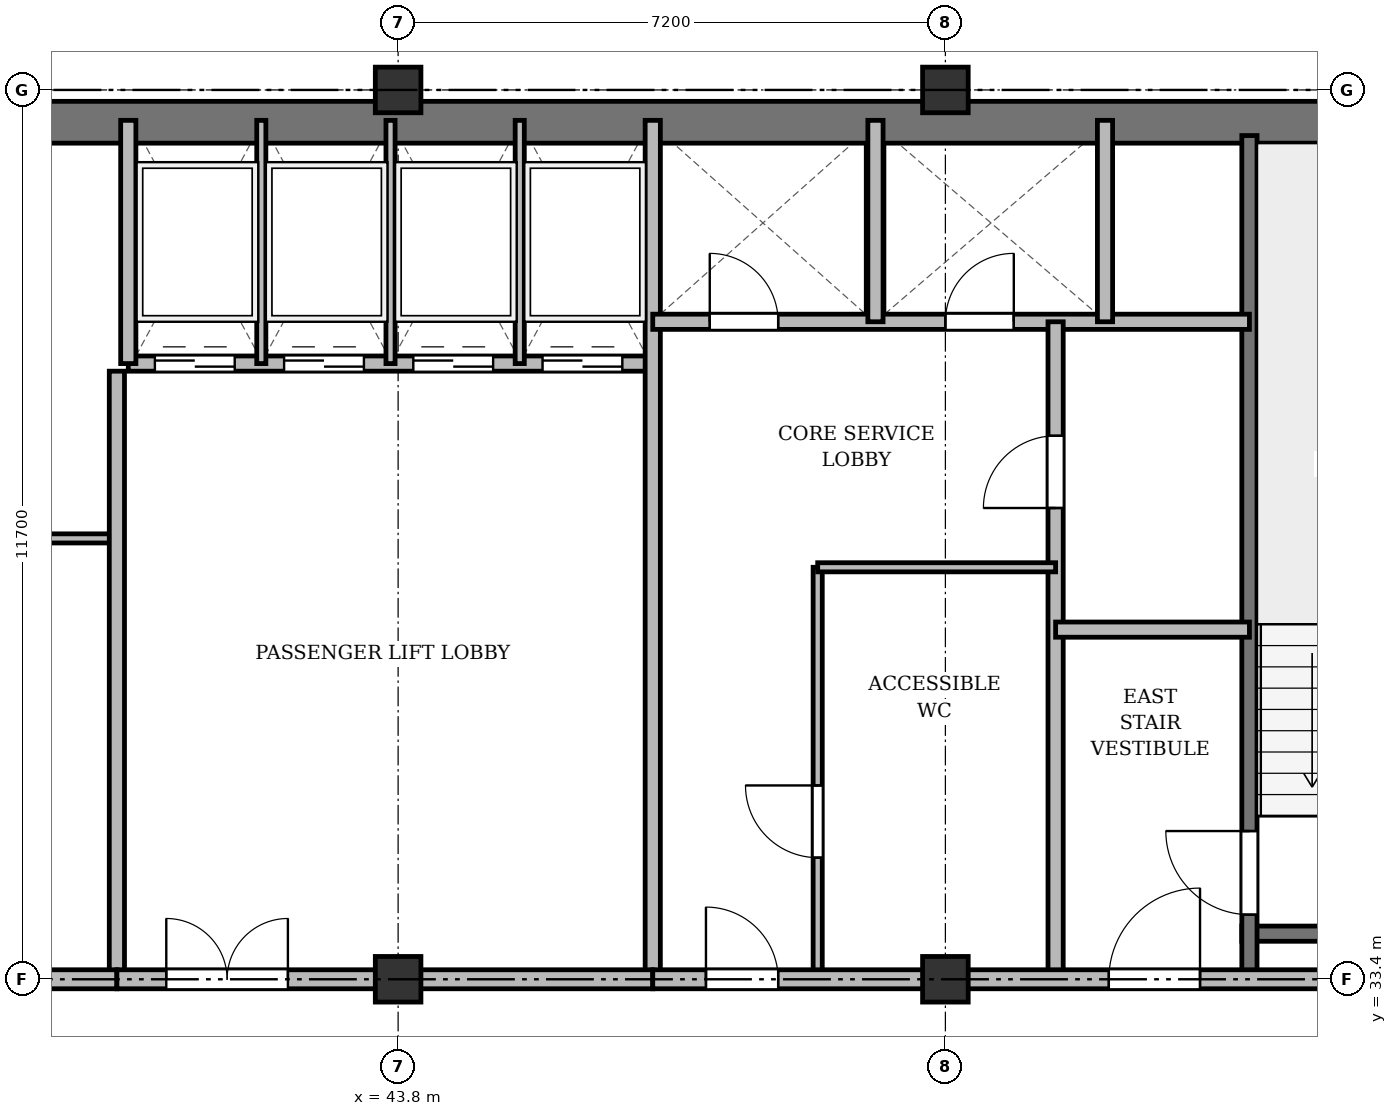
"""IFC4 building model, lengths in metres.
Left out: names, types, materials, properties, quantities, classifications, styles, units other than length and angle.
Written with IfcOpenShell. Run it as: python <this file> out.ifc"""

import sys

from ifc_helpers import new_model, si_unit, direction, frame, frame_2d, origin, origin_2d, place, context, subcontext, project, spatial, rectangle, extrude, source, transform, mapped, element, fill, save


model = new_model("IFC4")
c1 = context("Model", 3, precision=1e-05, world=origin(), true_north=direction((0.0, 1.0)))
c2 = subcontext(c1, "Body", "Model", "MODEL_VIEW")
j1 = project(units=[si_unit("LENGTHUNIT", "METRE"), si_unit("PLANEANGLEUNIT", "RADIAN")], contexts=[c1])
p1 = place(None, origin())
s1 = spatial("IfcSite", under=j1, at=p1, CompositionType="ELEMENT")
p2 = place(p1, origin())
s2 = spatial("IfcBuilding", under=s1, at=p2, CompositionType="ELEMENT")
p3 = place(p2, frame((0.0, 0.0, 277.5)))
s3 = spatial("IfcBuildingStorey", under=s2, at=p3, CompositionType="ELEMENT", Elevation=277.5)
m1 = source(origin(), c2, "Body", "SweptSolid", [
    extrude(rectangle(XDim=0.6, YDim=0.6, at=origin_2d()), origin(), (0.0, 0.0, 1.0), 3.6),
])
for number, where, z_axis, x_axis in (
    (1, (43.8, 33.4, 0.0), (0.0, 0.0, 1.0), (1.0, 0.0, 0.0)),
    (2, (43.8, 45.1, 0.0), (0.0, 0.0, 1.0), (1.0, 0.0, 0.0)),
    (3, (51.0, 33.4, 0.0), (0.0, 0.0, 1.0), (1.0, 0.0, 0.0)),
    (4, (51.0, 45.1, 0.0), (0.0, 0.0, 1.0), (1.0, 0.0, 0.0)),
):
    element("IfcColumn", number, at=place(p3, frame(where, z_axis=z_axis, x_axis=x_axis)), inside=s3, PredefinedType="COLUMN", context=c2, shape_type="MappedRepresentation", body=[
        mapped(m1, transform((0.0, 0.0, 0.0), x_axis=(1.0, 0.0, 0.0), y_axis=(0.0, 1.0, 0.0), z_axis=(0.0, 0.0, 1.0), scale=1.0)),
    ])
p4 = place(p3, frame((15.65, 44.675, 0.0), z_axis=(0.0, 0.0, 1.0), x_axis=(1.0, 0.0, 0.0)))
e5 = element("IfcWall", 5, at=p4, inside=s3, PredefinedType="SHEAR", context=c2, shape_type="SweptSolid", body=[
    extrude(rectangle(XDim=43.1, YDim=0.55, at=frame_2d((21.55, 0.0))), origin(), (0.0, 0.0, 1.0), 3.37),
])
p5 = place(p3, frame((54.9, 34.0, 0.0), z_axis=(0.0, 0.0, 1.0), x_axis=(1.0, 0.0, 0.0)))
e6 = element("IfcWall", 6, at=p5, inside=s3, PredefinedType="SHEAR", context=c2, shape_type="SweptSolid", body=[
    extrude(rectangle(XDim=3.4, YDim=0.2, at=frame_2d((1.7, 0.0))), origin(), (0.0, 0.0, 1.0), 3.37),
])
p6 = place(p3, frame((55.0, 33.4, 0.0), z_axis=(0.0, 0.0, 1.0), x_axis=(0.0, 1.0, 0.0)))
e7 = element("IfcWall", 7, at=p6, inside=s3, PredefinedType="SHEAR", context=c2, shape_type="SweptSolid", body=[
    extrude(rectangle(XDim=11.1, YDim=0.2, at=frame_2d((5.55, 0.0))), origin(), (0.0, 0.0, 1.0), 3.37),
])
p7 = place(p6, frame((0.85, 0.0, 0.0)))
e8 = element("IfcOpeningElement", 8, at=p7, cuts=e7, PredefinedType="OPENING", context=c2, shape_type="SweptSolid", body=[
    extrude(rectangle(XDim=1.1, YDim=2.15, at=frame_2d((0.55, 1.075))), frame((0.0, 0.11, 0.0), z_axis=(0.0, -1.0, 0.0), x_axis=(1.0, 0.0, 0.0)), (0.0, 0.0, 1.0), 0.22),
])
p8 = place(p3, frame((33.3, 39.2, 0.0), z_axis=(0.0, 0.0, 1.0), x_axis=(1.0, 0.0, 0.0)))
e9 = element("IfcWall", 9, at=p8, inside=s3, PredefinedType="PARTITIONING", context=c2, shape_type="SweptSolid", body=[
    extrude(rectangle(XDim=6.8, YDim=0.12, at=frame_2d((3.4, 0.0))), origin(), (0.0, 0.0, 1.0), 3.37),
])
p9 = place(p8, frame((2.6, 0.0, 0.0)))
e10 = element("IfcOpeningElement", 10, at=p9, cuts=e9, PredefinedType="OPENING", context=c2, shape_type="SweptSolid", body=[
    extrude(rectangle(XDim=0.95, YDim=2.15, at=frame_2d((0.475, 1.075))), frame((0.0, 0.07, 0.0), z_axis=(0.0, -1.0, 0.0), x_axis=(1.0, 0.0, 0.0)), (0.0, 0.0, 1.0), 0.14),
])
p10 = place(p3, frame((40.1, 33.4, 0.0), z_axis=(0.0, 0.0, 1.0), x_axis=(0.0, 1.0, 0.0)))
e11 = element("IfcWall", 11, at=p10, inside=s3, PredefinedType="SOLIDWALL", context=c2, shape_type="SweptSolid", body=[
    extrude(rectangle(XDim=8.0, YDim=0.2, at=frame_2d((4.0, 0.0))), origin(), (0.0, 0.0, 1.0), 2.92),
])
p11 = place(p3, frame((40.25, 41.5, 0.0), z_axis=(0.0, 0.0, 1.0), x_axis=(1.0, 0.0, 0.0)))
e12 = element("IfcWall", 12, at=p11, inside=s3, PredefinedType="SOLIDWALL", context=c2, shape_type="SweptSolid", body=[
    extrude(rectangle(XDim=6.9, YDim=0.2, at=frame_2d((3.45, 0.0))), origin(), (0.0, 0.0, 1.0), 3.37),
])
p12 = place(p11, frame((0.35, 0.0, 0.0)))
e13 = element("IfcOpeningElement", 13, at=p12, cuts=e12, PredefinedType="OPENING", context=c2, shape_type="SweptSolid", body=[
    extrude(rectangle(XDim=1.05, YDim=2.15, at=frame_2d((0.525, 1.075))), frame((0.0, 0.11, 0.0), z_axis=(0.0, -1.0, 0.0), x_axis=(1.0, 0.0, 0.0)), (0.0, 0.0, 1.0), 0.22),
])
p13 = place(p11, frame((2.05, 0.0, 0.0)))
e14 = element("IfcOpeningElement", 14, at=p13, cuts=e12, PredefinedType="OPENING", context=c2, shape_type="SweptSolid", body=[
    extrude(rectangle(XDim=1.05, YDim=2.15, at=frame_2d((0.525, 1.075))), frame((0.0, 0.11, 0.0), z_axis=(0.0, -1.0, 0.0), x_axis=(1.0, 0.0, 0.0)), (0.0, 0.0, 1.0), 0.22),
])
p14 = place(p11, frame((3.75, 0.0, 0.0)))
e15 = element("IfcOpeningElement", 15, at=p14, cuts=e12, PredefinedType="OPENING", context=c2, shape_type="SweptSolid", body=[
    extrude(rectangle(XDim=1.05, YDim=2.15, at=frame_2d((0.525, 1.075))), frame((0.0, 0.11, 0.0), z_axis=(0.0, -1.0, 0.0), x_axis=(1.0, 0.0, 0.0)), (0.0, 0.0, 1.0), 0.22),
])
p15 = place(p11, frame((5.45, 0.0, 0.0)))
e16 = element("IfcOpeningElement", 16, at=p15, cuts=e12, PredefinedType="OPENING", context=c2, shape_type="SweptSolid", body=[
    extrude(rectangle(XDim=1.05, YDim=2.15, at=frame_2d((0.525, 1.075))), frame((0.0, 0.11, 0.0), z_axis=(0.0, -1.0, 0.0), x_axis=(1.0, 0.0, 0.0)), (0.0, 0.0, 1.0), 0.22),
])
p16 = place(p3, frame((40.25, 41.5, 0.0), z_axis=(0.0, 0.0, 1.0), x_axis=(0.0, 1.0, 0.0)))
e17 = element("IfcWall", 17, at=p16, inside=s3, PredefinedType="SOLIDWALL", context=c2, shape_type="SweptSolid", body=[
    extrude(rectangle(XDim=3.2, YDim=0.2, at=frame_2d((1.6, 0.0))), origin(), (0.0, 0.0, 1.0), 3.37),
])
for number, where, z_axis, x_axis in (
    (18, (42.0, 41.5, 0.0), (0.0, 0.0, 1.0), (0.0, 1.0, 0.0)),
    (19, (43.7, 41.5, 0.0), (0.0, 0.0, 1.0), (0.0, 1.0, 0.0)),
    (20, (45.4, 41.5, 0.0), (0.0, 0.0, 1.0), (0.0, 1.0, 0.0)),
):
    element("IfcWall", number, at=place(p3, frame(where, z_axis=z_axis, x_axis=x_axis)), inside=s3, PredefinedType="PARTITIONING", context=c2, shape_type="SweptSolid", body=[
        extrude(rectangle(XDim=3.2, YDim=0.12, at=frame_2d((1.6, 0.0))), origin(), (0.0, 0.0, 1.0), 3.37),
    ])
p17 = place(p3, frame((47.15, 33.4, 0.0), z_axis=(0.0, 0.0, 1.0), x_axis=(0.0, 1.0, 0.0)))
e21 = element("IfcWall", 21, at=p17, inside=s3, PredefinedType="SOLIDWALL", context=c2, shape_type="SweptSolid", body=[
    extrude(rectangle(XDim=11.3, YDim=0.2, at=frame_2d((5.65, 0.0))), origin(), (0.0, 0.0, 1.0), 2.92),
])
p18 = place(p3, frame((33.3, 33.4, 0.0), z_axis=(0.0, 0.0, 1.0), x_axis=(1.0, 0.0, 0.0)))
e22 = element("IfcWall", 22, at=p18, inside=s3, PredefinedType="PARTITIONING", context=c2, shape_type="SweptSolid", body=[
    extrude(rectangle(XDim=6.8, YDim=0.25, at=frame_2d((3.4, 0.0))), origin(), (0.0, 0.0, 1.0), 2.92),
])
p19 = place(p18, frame((2.4, 0.0, 0.0)))
e23 = element("IfcOpeningElement", 23, at=p19, cuts=e22, PredefinedType="OPENING", context=c2, shape_type="SweptSolid", body=[
    extrude(rectangle(XDim=1.0, YDim=2.15, at=frame_2d((0.5, 1.075))), frame((0.0, 0.135, 0.0), z_axis=(0.0, -1.0, 0.0), x_axis=(1.0, 0.0, 0.0)), (0.0, 0.0, 1.0), 0.27),
])
p20 = place(p3, frame((40.1, 33.4, 0.0), z_axis=(0.0, 0.0, 1.0), x_axis=(1.0, 0.0, 0.0)))
e24 = element("IfcWall", 24, at=p20, inside=s3, PredefinedType="PARTITIONING", context=c2, shape_type="SweptSolid", body=[
    extrude(rectangle(XDim=7.05, YDim=0.25, at=frame_2d((3.525, 0.0))), origin(), (0.0, 0.0, 1.0), 2.92),
])
p21 = place(p20, frame((0.65, 0.0, 0.0)))
e25 = element("IfcOpeningElement", 25, at=p21, cuts=e24, PredefinedType="OPENING", context=c2, shape_type="SweptSolid", body=[
    extrude(rectangle(XDim=1.6, YDim=2.2, at=frame_2d((0.8, 1.1))), frame((0.0, 0.135, 0.0), z_axis=(0.0, -1.0, 0.0), x_axis=(1.0, 0.0, 0.0)), (0.0, 0.0, 1.0), 0.27),
])
p22 = place(p3, frame((47.15, 42.05, 0.0), z_axis=(0.0, 0.0, 1.0), x_axis=(1.0, 0.0, 0.0)))
e26 = element("IfcWall", 26, at=p22, inside=s3, PredefinedType="SOLIDWALL", context=c2, shape_type="SweptSolid", body=[
    extrude(rectangle(XDim=7.85, YDim=0.2, at=frame_2d((3.925, 0.0))), origin(), (0.0, 0.0, 1.0), 2.87),
])
p23 = place(p22, frame((0.75, 0.0, 0.0)))
e27 = element("IfcOpeningElement", 27, at=p23, cuts=e26, PredefinedType="OPENING", context=c2, shape_type="SweptSolid", body=[
    extrude(rectangle(XDim=0.9, YDim=2.1, at=frame_2d((0.45, 1.05))), frame((0.0, 0.11, 0.0), z_axis=(0.0, -1.0, 0.0), x_axis=(1.0, 0.0, 0.0)), (0.0, 0.0, 1.0), 0.22),
])
p24 = place(p22, frame((3.85, 0.0, 0.0)))
e28 = element("IfcOpeningElement", 28, at=p24, cuts=e26, PredefinedType="OPENING", context=c2, shape_type="SweptSolid", body=[
    extrude(rectangle(XDim=0.9, YDim=2.1, at=frame_2d((0.45, 1.05))), frame((0.0, 0.11, 0.0), z_axis=(0.0, -1.0, 0.0), x_axis=(1.0, 0.0, 0.0)), (0.0, 0.0, 1.0), 0.22),
])
for number, where, z_axis, x_axis in (
    (29, (50.08, 42.05, 0.0), (0.0, 0.0, 1.0), (0.0, 1.0, 0.0)),
    (30, (53.1, 42.05, 0.0), (0.0, 0.0, 1.0), (0.0, 1.0, 0.0)),
):
    element("IfcWall", number, at=place(p3, frame(where, z_axis=z_axis, x_axis=x_axis)), inside=s3, PredefinedType="SOLIDWALL", context=c2, shape_type="SweptSolid", body=[
        extrude(rectangle(XDim=2.65, YDim=0.2, at=frame_2d((1.325, 0.0))), origin(), (0.0, 0.0, 1.0), 3.37),
    ])
p25 = place(p3, frame((52.45, 33.4, 0.0), z_axis=(0.0, 0.0, 1.0), x_axis=(0.0, 1.0, 0.0)))
e31 = element("IfcWall", 31, at=p25, inside=s3, PredefinedType="PARTITIONING", context=c2, shape_type="SweptSolid", body=[
    extrude(rectangle(XDim=8.65, YDim=0.2, at=frame_2d((4.325, 0.0))), origin(), (0.0, 0.0, 1.0), 2.92),
])
p26 = place(p25, frame((6.2, 0.0, 0.0)))
e32 = element("IfcOpeningElement", 32, at=p26, cuts=e31, PredefinedType="OPENING", context=c2, shape_type="SweptSolid", body=[
    extrude(rectangle(XDim=0.95, YDim=2.15, at=frame_2d((0.475, 1.075))), frame((0.0, 0.11, 0.0), z_axis=(0.0, -1.0, 0.0), x_axis=(1.0, 0.0, 0.0)), (0.0, 0.0, 1.0), 0.22),
])
p27 = place(p3, frame((52.45, 38.0, 0.0), z_axis=(0.0, 0.0, 1.0), x_axis=(1.0, 0.0, 0.0)))
e33 = element("IfcWall", 33, at=p27, inside=s3, PredefinedType="PARTITIONING", context=c2, shape_type="SweptSolid", body=[
    extrude(rectangle(XDim=2.55, YDim=0.2, at=frame_2d((1.275, 0.0))), origin(), (0.0, 0.0, 1.0), 3.37),
])
p28 = place(p3, frame((49.32, 33.4, 0.0), z_axis=(0.0, 0.0, 1.0), x_axis=(0.0, 1.0, 0.0)))
e34 = element("IfcWall", 34, at=p28, inside=s3, PredefinedType="PARTITIONING", context=c2, shape_type="SweptSolid", body=[
    extrude(rectangle(XDim=5.42, YDim=0.12, at=frame_2d((2.71, 0.0))), origin(), (0.0, 0.0, 1.0), 2.92),
])
p29 = place(p28, frame((1.6, 0.0, 0.0)))
e35 = element("IfcOpeningElement", 35, at=p29, cuts=e34, PredefinedType="OPENING", context=c2, shape_type="SweptSolid", body=[
    extrude(rectangle(XDim=0.95, YDim=2.15, at=frame_2d((0.475, 1.075))), frame((0.0, 0.07, 0.0), z_axis=(0.0, -1.0, 0.0), x_axis=(1.0, 0.0, 0.0)), (0.0, 0.0, 1.0), 0.14),
])
p30 = place(p3, frame((49.32, 38.82, 0.0), z_axis=(0.0, 0.0, 1.0), x_axis=(1.0, 0.0, 0.0)))
e36 = element("IfcWall", 36, at=p30, inside=s3, PredefinedType="PARTITIONING", context=c2, shape_type="SweptSolid", body=[
    extrude(rectangle(XDim=3.13, YDim=0.12, at=frame_2d((1.565, 0.0))), origin(), (0.0, 0.0, 1.0), 2.87),
])
p31 = place(p3, frame((47.15, 33.4, 0.0), z_axis=(0.0, 0.0, 1.0), x_axis=(1.0, 0.0, 0.0)))
e37 = element("IfcWall", 37, at=p31, inside=s3, PredefinedType="PARTITIONING", context=c2, shape_type="SweptSolid", body=[
    extrude(rectangle(XDim=11.15, YDim=0.25, at=frame_2d((5.575, 0.0))), origin(), (0.0, 0.0, 1.0), 2.92),
])
p32 = place(p31, frame((0.7, 0.0, 0.0)))
e38 = element("IfcOpeningElement", 38, at=p32, cuts=e37, PredefinedType="OPENING", context=c2, shape_type="SweptSolid", body=[
    extrude(rectangle(XDim=0.95, YDim=2.15, at=frame_2d((0.475, 1.075))), frame((0.0, 0.135, 0.0), z_axis=(0.0, -1.0, 0.0), x_axis=(1.0, 0.0, 0.0)), (0.0, 0.0, 1.0), 0.27),
])
p33 = place(p31, frame((6.0, 0.0, 0.0)))
e39 = element("IfcOpeningElement", 39, at=p33, cuts=e37, PredefinedType="OPENING", context=c2, shape_type="SweptSolid", body=[
    extrude(rectangle(XDim=1.2, YDim=2.15, at=frame_2d((0.6, 1.075))), frame((0.0, 0.135, 0.0), z_axis=(0.0, -1.0, 0.0), x_axis=(1.0, 0.0, 0.0)), (0.0, 0.0, 1.0), 0.27),
])
m2 = source(origin(), c2, "Body", "SweptSolid", [
    extrude(rectangle(XDim=1.1, YDim=2.15, at=frame_2d((0.55, 1.075))), frame((0.0, 0.025, 0.0), z_axis=(0.0, -1.0, 0.0), x_axis=(1.0, 0.0, 0.0)), (0.0, 0.0, 1.0), 0.05),
])
p34 = place(p7, origin())
e40 = element("IfcDoor", 40, at=p34, inside=s3, OperationType="SINGLE_SWING_RIGHT", PredefinedType="DOOR", context=c2, shape_type="MappedRepresentation", body=[
    mapped(m2, transform((0.0, 0.0, 0.0), x_axis=(1.0, 0.0, 0.0), y_axis=(0.0, 1.0, 0.0), z_axis=(0.0, 0.0, 1.0), scale=1.0)),
])
fill(e8, e40)
m3 = source(origin(), c2, "Body", "SweptSolid", [
    extrude(rectangle(XDim=1.05, YDim=2.15, at=frame_2d((0.525, 1.075))), frame((0.0, 0.025, 0.0), z_axis=(0.0, -1.0, 0.0), x_axis=(1.0, 0.0, 0.0)), (0.0, 0.0, 1.0), 0.05),
])
p35 = place(p12, origin())
e41 = element("IfcDoor", 41, at=p35, inside=s3, OperationType="DOUBLE_DOOR_SLIDING", PredefinedType="DOOR", context=c2, shape_type="MappedRepresentation", body=[
    mapped(m3, transform((0.0, 0.0, 0.0), x_axis=(1.0, 0.0, 0.0), y_axis=(0.0, 1.0, 0.0), z_axis=(0.0, 0.0, 1.0), scale=1.0)),
])
fill(e13, e41)
p36 = place(p13, origin())
e42 = element("IfcDoor", 42, at=p36, inside=s3, OperationType="DOUBLE_DOOR_SLIDING", PredefinedType="DOOR", context=c2, shape_type="MappedRepresentation", body=[
    mapped(m3, transform((0.0, 0.0, 0.0), x_axis=(1.0, 0.0, 0.0), y_axis=(0.0, 1.0, 0.0), z_axis=(0.0, 0.0, 1.0), scale=1.0)),
])
fill(e14, e42)
p37 = place(p14, origin())
e43 = element("IfcDoor", 43, at=p37, inside=s3, OperationType="DOUBLE_DOOR_SLIDING", PredefinedType="DOOR", context=c2, shape_type="MappedRepresentation", body=[
    mapped(m3, transform((0.0, 0.0, 0.0), x_axis=(1.0, 0.0, 0.0), y_axis=(0.0, 1.0, 0.0), z_axis=(0.0, 0.0, 1.0), scale=1.0)),
])
fill(e15, e43)
p38 = place(p15, origin())
e44 = element("IfcDoor", 44, at=p38, inside=s3, OperationType="DOUBLE_DOOR_SLIDING", PredefinedType="DOOR", context=c2, shape_type="MappedRepresentation", body=[
    mapped(m3, transform((0.0, 0.0, 0.0), x_axis=(1.0, 0.0, 0.0), y_axis=(0.0, 1.0, 0.0), z_axis=(0.0, 0.0, 1.0), scale=1.0)),
])
fill(e16, e44)
m4 = source(origin(), c2, "Body", "SweptSolid", [
    extrude(rectangle(XDim=1.6, YDim=2.2, at=frame_2d((0.8, 1.1))), frame((0.0, 0.025, 0.0), z_axis=(0.0, -1.0, 0.0), x_axis=(1.0, 0.0, 0.0)), (0.0, 0.0, 1.0), 0.05),
])
p39 = place(p21, origin())
e45 = element("IfcDoor", 45, at=p39, inside=s3, OperationType="DOUBLE_DOOR_SINGLE_SWING", PredefinedType="DOOR", context=c2, shape_type="MappedRepresentation", body=[
    mapped(m4, transform((0.0, 0.0, 0.0), x_axis=(1.0, 0.0, 0.0), y_axis=(0.0, 1.0, 0.0), z_axis=(0.0, 0.0, 1.0), scale=1.0)),
])
fill(e25, e45)
m5 = source(origin(), c2, "Body", "SweptSolid", [
    extrude(rectangle(XDim=0.9, YDim=2.1, at=frame_2d((0.45, 1.05))), frame((0.0, 0.025, 0.0), z_axis=(0.0, -1.0, 0.0), x_axis=(1.0, 0.0, 0.0)), (0.0, 0.0, 1.0), 0.05),
])
p40 = place(p23, origin())
e46 = element("IfcDoor", 46, at=p40, inside=s3, OperationType="SINGLE_SWING_LEFT", PredefinedType="DOOR", context=c2, shape_type="MappedRepresentation", body=[
    mapped(m5, transform((0.0, 0.0, 0.0), x_axis=(1.0, 0.0, 0.0), y_axis=(0.0, 1.0, 0.0), z_axis=(0.0, 0.0, 1.0), scale=1.0)),
])
fill(e27, e46)
p41 = place(p24, origin())
e47 = element("IfcDoor", 47, at=p41, inside=s3, OperationType="SINGLE_SWING_RIGHT", PredefinedType="DOOR", context=c2, shape_type="MappedRepresentation", body=[
    mapped(m5, transform((0.0, 0.0, 0.0), x_axis=(1.0, 0.0, 0.0), y_axis=(0.0, 1.0, 0.0), z_axis=(0.0, 0.0, 1.0), scale=1.0)),
])
fill(e28, e47)
m6 = source(origin(), c2, "Body", "SweptSolid", [
    extrude(rectangle(XDim=0.95, YDim=2.15, at=frame_2d((0.475, 1.075))), frame((0.0, 0.025, 0.0), z_axis=(0.0, -1.0, 0.0), x_axis=(1.0, 0.0, 0.0)), (0.0, 0.0, 1.0), 0.05),
])
p42 = place(p26, origin())
e48 = element("IfcDoor", 48, at=p42, inside=s3, OperationType="SINGLE_SWING_LEFT", PredefinedType="DOOR", context=c2, shape_type="MappedRepresentation", body=[
    mapped(m6, transform((0.0, 0.0, 0.0), x_axis=(1.0, 0.0, 0.0), y_axis=(0.0, 1.0, 0.0), z_axis=(0.0, 0.0, 1.0), scale=1.0)),
])
fill(e32, e48)
p43 = place(p29, origin())
e49 = element("IfcDoor", 49, at=p43, inside=s3, OperationType="SINGLE_SWING_RIGHT", PredefinedType="DOOR", context=c2, shape_type="MappedRepresentation", body=[
    mapped(m6, transform((0.0, 0.0, 0.0), x_axis=(1.0, 0.0, 0.0), y_axis=(0.0, 1.0, 0.0), z_axis=(0.0, 0.0, 1.0), scale=1.0)),
])
fill(e35, e49)
p44 = place(p32, origin())
e50 = element("IfcDoor", 50, at=p44, inside=s3, OperationType="SINGLE_SWING_LEFT", PredefinedType="DOOR", context=c2, shape_type="MappedRepresentation", body=[
    mapped(m6, transform((0.0, 0.0, 0.0), x_axis=(1.0, 0.0, 0.0), y_axis=(0.0, 1.0, 0.0), z_axis=(0.0, 0.0, 1.0), scale=1.0)),
])
fill(e38, e50)
m7 = source(origin(), c2, "Body", "SweptSolid", [
    extrude(rectangle(XDim=1.2, YDim=2.15, at=frame_2d((0.6, 1.075))), frame((0.0, 0.025, 0.0), z_axis=(0.0, -1.0, 0.0), x_axis=(1.0, 0.0, 0.0)), (0.0, 0.0, 1.0), 0.05),
])
p45 = place(p33, origin())
e51 = element("IfcDoor", 51, at=p45, inside=s3, OperationType="SINGLE_SWING_RIGHT", PredefinedType="DOOR", context=c2, shape_type="MappedRepresentation", body=[
    mapped(m7, transform((0.0, 0.0, 0.0), x_axis=(1.0, 0.0, 0.0), y_axis=(0.0, 1.0, 0.0), z_axis=(0.0, 0.0, 1.0), scale=1.0)),
])
fill(e39, e51)
save(model, sys.argv[1])
